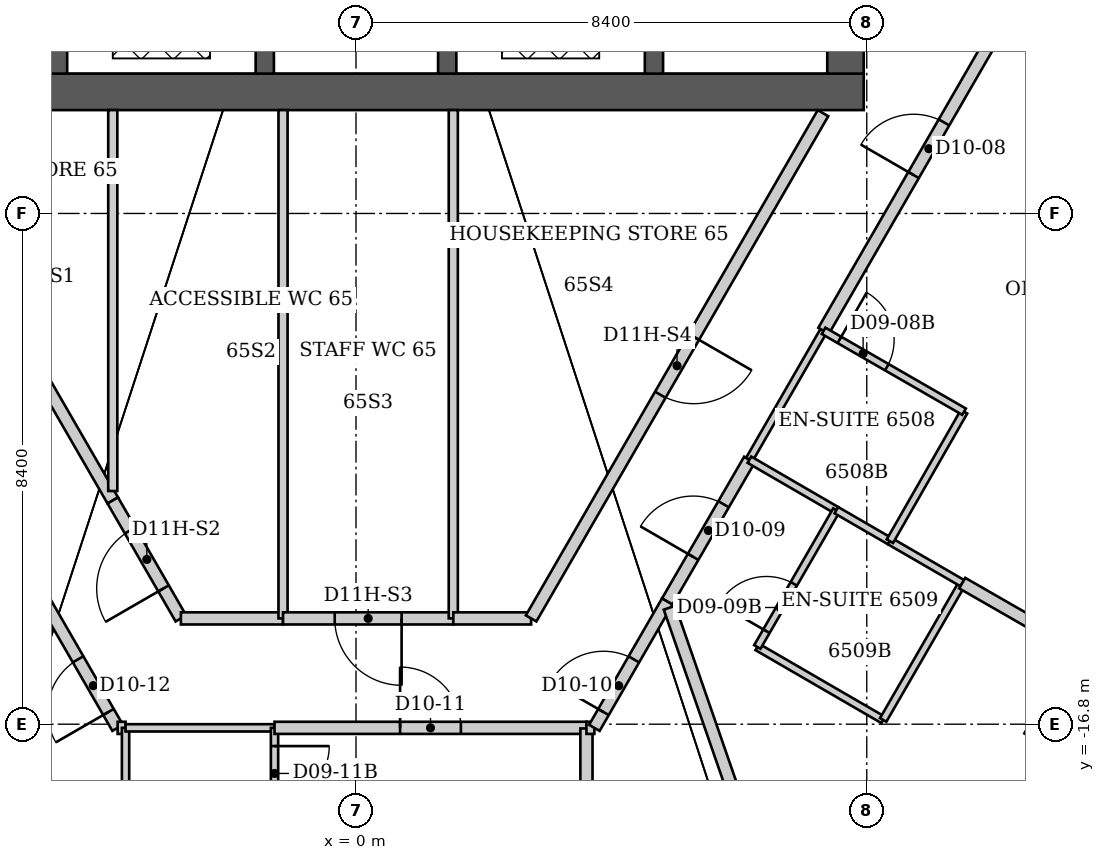
"""IFC4 building model, lengths in metres.
Left out: names, types, materials, properties, quantities, classifications, styles, units other than length and angle.
Written with IfcOpenShell. Run it as: python <this file> out.ifc"""

import sys

from ifc_helpers import new_model, si_unit, direction, frame, frame_2d, origin, place, context, subcontext, project, spatial, rectangle, extrude, element, fill, save


model = new_model("IFC4")
c1 = context("Model", 3, precision=1e-05, world=origin(), true_north=direction((0.0, 1.0)))
c2 = subcontext(c1, "Body", "Model", "MODEL_VIEW")
j1 = project(units=[si_unit("LENGTHUNIT", "METRE"), si_unit("PLANEANGLEUNIT", "RADIAN")], contexts=[c1])
p1 = place(None, origin())
s1 = spatial("IfcSite", under=j1, at=p1, CompositionType="ELEMENT")
p2 = place(p1, origin())
s2 = spatial("IfcBuilding", under=s1, at=p2, CompositionType="ELEMENT")
p3 = place(p2, frame((0.0, 0.0, 260.8)))
s3 = spatial("IfcBuildingStorey", under=s2, at=p3, CompositionType="ELEMENT", Elevation=260.8)
p4 = place(p3, frame((-8.35, -6.4, 0.0), z_axis=(0.0, 0.0, 1.0), x_axis=(1.0, 0.0, 0.0)))
e1 = element("IfcWall", 1, at=p4, inside=s3, PredefinedType="SHEAR", context=c2, shape_type="SweptSolid", body=[
    extrude(rectangle(XDim=16.7, YDim=0.6, at=frame_2d((8.35, 0.0))), origin(), (0.0, 0.0, 1.0), 3.8),
])
p5 = place(p3, frame((8.05, -6.1, 0.0), z_axis=(0.0, 0.0, 1.0), x_axis=(0.0, 1.0, 0.0)))
e2 = element("IfcWall", 2, at=p5, inside=s3, PredefinedType="SHEAR", context=c2, shape_type="SweptSolid", body=[
    extrude(rectangle(XDim=12.2, YDim=0.6, at=frame_2d((6.1, 0.0))), origin(), (0.0, 0.0, 1.0), 3.8),
])
p6 = place(p5, frame((7.6, 0.0, 0.0)))
e3 = element("IfcOpeningElement", 3, at=p6, cuts=e2, PredefinedType="OPENING", context=c2, shape_type="SweptSolid", body=[
    extrude(rectangle(XDim=1.2, YDim=2.2, at=frame_2d((0.6, 1.1))), frame((0.0, 0.3, 0.0), z_axis=(0.0, -1.0, 0.0), x_axis=(1.0, 0.0, 0.0)), (0.0, 0.0, 1.0), 0.6),
])
for number, where, z_axis, x_axis in (
    (4, (-4.9, -6.1, 0.0), (0.0, 0.0, 1.0), (0.0, 1.0, 0.0)),
    (5, (-1.5, -6.1, 0.0), (0.0, 0.0, 1.0), (0.0, 1.0, 0.0)),
    (6, (1.5, -6.1, 0.0), (0.0, 0.0, 1.0), (0.0, 1.0, 0.0)),
    (7, (4.9, -6.1, 0.0), (0.0, 0.0, 1.0), (0.0, 1.0, 0.0)),
):
    element("IfcWall", number, at=place(p3, frame(where, z_axis=z_axis, x_axis=x_axis)), inside=s3, PredefinedType="SHEAR", context=c2, shape_type="SweptSolid", body=[
        extrude(rectangle(XDim=7.2, YDim=0.3, at=frame_2d((3.6, 0.0))), origin(), (0.0, 0.0, 1.0), 3.8),
    ])
p7 = place(p3, frame((-5.12, -14.78, 0.0), z_axis=(0.0, 0.0, 1.0), x_axis=(0.499813401482, -0.866133109688, 0.0)))
e8 = element("IfcWall", 8, at=p7, inside=s3, PredefinedType="PARTITIONING", context=c2, shape_type="SweptSolid", body=[
    extrude(rectangle(XDim=2.401, YDim=0.2, at=frame_2d((1.201, 0.0))), origin(), (0.0, 0.0, 1.0), 3.64),
])
p8 = place(p7, frame((1.1, 0.0, 0.0)))
e9 = element("IfcOpeningElement", 9, at=p8, cuts=e8, PredefinedType="OPENING", context=c2, shape_type="SweptSolid", body=[
    extrude(rectangle(XDim=1.0, YDim=2.13, at=frame_2d((0.5, 1.065))), frame((0.0, 0.1, 0.0), z_axis=(0.0, -1.0, 0.0), x_axis=(1.0, 0.0, 0.0)), (0.0, 0.0, 1.0), 0.2),
])
p9 = place(p3, frame((-4.0, -13.12, 0.0), z_axis=(0.0, 0.0, 1.0), x_axis=(-0.500218436225, 0.865899252835, 0.0)))
e10 = element("IfcWall", 10, at=p9, inside=s3, PredefinedType="PARTITIONING", context=c2, shape_type="SweptSolid", body=[
    extrude(rectangle(XDim=7.357, YDim=0.2, at=frame_2d((3.678, 0.0))), origin(), (0.0, 0.0, 1.0), 3.64),
])
p10 = place(p9, frame((3.128, 0.0, 0.0)))
e11 = element("IfcOpeningElement", 11, at=p10, cuts=e10, PredefinedType="OPENING", context=c2, shape_type="SweptSolid", body=[
    extrude(rectangle(XDim=1.1, YDim=2.2, at=frame_2d((0.55, 1.1))), frame((0.0, 0.1, 0.0), z_axis=(0.0, -1.0, 0.0), x_axis=(1.0, 0.0, 0.0)), (0.0, 0.0, 1.0), 0.2),
])
p11 = place(p3, frame((-4.0, -6.7, 0.0), z_axis=(0.0, 0.0, 1.0), x_axis=(0.0, -1.0, 0.0)))
e12 = element("IfcWall", 12, at=p11, inside=s3, PredefinedType="PARTITIONING", context=c2, shape_type="SweptSolid", body=[
    extrude(rectangle(XDim=6.265, YDim=0.15, at=frame_2d((3.133, 0.0))), origin(), (0.0, 0.0, 1.0), 3.64),
])
p12 = place(p3, frame((-3.92, -16.86, 0.0), z_axis=(0.0, 0.0, 1.0), x_axis=(1.0, 0.0, 0.0)))
e13 = element("IfcWall", 13, at=p12, inside=s3, PredefinedType="PARTITIONING", context=c2, shape_type="SweptSolid", body=[
    extrude(rectangle(XDim=0.13, YDim=0.2, at=frame_2d((0.065, 0.0))), origin(), (0.0, 0.0, 1.0), 3.64),
])
p13 = place(p3, frame((-3.79, -19.53, 0.0), z_axis=(0.0, 0.0, 1.0), x_axis=(0.0, 1.0, 0.0)))
e14 = element("IfcWall", 14, at=p13, inside=s3, PredefinedType="PARTITIONING", context=c2, shape_type="SweptSolid", body=[
    extrude(rectangle(XDim=2.67, YDim=0.12, at=frame_2d((1.335, 0.0))), origin(), (0.0, 0.0, 1.0), 3.64),
])
p14 = place(p3, frame((-3.79, -16.86, 0.0), z_axis=(0.0, 0.0, 1.0), x_axis=(1.0, 0.0, 0.0)))
e15 = element("IfcWall", 15, at=p14, inside=s3, PredefinedType="PARTITIONING", context=c2, shape_type="SweptSolid", body=[
    extrude(rectangle(XDim=2.45, YDim=0.12, at=frame_2d((1.225, 0.0))), origin(), (0.0, 0.0, 1.0), 3.64),
])
p15 = place(p3, frame((-2.88, -15.06, 0.0), z_axis=(0.0, 0.0, 1.0), x_axis=(-0.499983441833, 0.866034963436, 0.0)))
e16 = element("IfcWall", 16, at=p15, inside=s3, PredefinedType="PARTITIONING", context=c2, shape_type="SweptSolid", body=[
    extrude(rectangle(XDim=2.24, YDim=0.2, at=frame_2d((1.12, 0.0))), origin(), (0.0, 0.0, 1.0), 3.64),
])
p16 = place(p15, frame((0.57, 0.0, 0.0)))
e17 = element("IfcOpeningElement", 17, at=p16, cuts=e16, PredefinedType="OPENING", context=c2, shape_type="SweptSolid", body=[
    extrude(rectangle(XDim=1.1, YDim=2.2, at=frame_2d((0.55, 1.1))), frame((0.0, 0.1, 0.0), z_axis=(0.0, -1.0, 0.0), x_axis=(1.0, 0.0, 0.0)), (0.0, 0.0, 1.0), 0.2),
])
p17 = place(p3, frame((-1.34, -19.53, 0.0), z_axis=(0.0, 0.0, 1.0), x_axis=(0.0, 1.0, 0.0)))
e18 = element("IfcWall", 18, at=p17, inside=s3, PredefinedType="PARTITIONING", context=c2, shape_type="SweptSolid", body=[
    extrude(rectangle(XDim=2.67, YDim=0.12, at=frame_2d((1.335, 0.0))), origin(), (0.0, 0.0, 1.0), 3.64),
])
p18 = place(p17, frame((1.47, 0.0, 0.0)))
e19 = element("IfcOpeningElement", 19, at=p18, cuts=e18, PredefinedType="OPENING", context=c2, shape_type="SweptSolid", body=[
    extrude(rectangle(XDim=0.9, YDim=2.03, at=frame_2d((0.45, 1.015))), frame((0.0, 0.06, 0.0), z_axis=(0.0, -1.0, 0.0), x_axis=(1.0, 0.0, 0.0)), (0.0, 0.0, 1.0), 0.12),
])
p19 = place(p3, frame((-1.34, -16.86, 0.0), z_axis=(0.0, 0.0, 1.0), x_axis=(1.0, 0.0, 0.0)))
e20 = element("IfcWall", 20, at=p19, inside=s3, PredefinedType="PARTITIONING", context=c2, shape_type="SweptSolid", body=[
    extrude(rectangle(XDim=5.13, YDim=0.2, at=frame_2d((2.565, 0.0))), origin(), (0.0, 0.0, 1.0), 3.64),
])
p20 = place(p19, frame((2.065, 0.0, 0.0)))
e21 = element("IfcOpeningElement", 21, at=p20, cuts=e20, PredefinedType="OPENING", context=c2, shape_type="SweptSolid", body=[
    extrude(rectangle(XDim=1.0, YDim=2.13, at=frame_2d((0.5, 1.065))), frame((0.0, 0.1, 0.0), z_axis=(0.0, -1.0, 0.0), x_axis=(1.0, 0.0, 0.0)), (0.0, 0.0, 1.0), 0.2),
])
p21 = place(p3, frame((-1.2, -15.06, 0.0), z_axis=(0.0, 0.0, 1.0), x_axis=(-1.0, 0.0, 0.0)))
e22 = element("IfcWall", 22, at=p21, inside=s3, PredefinedType="PARTITIONING", context=c2, shape_type="SweptSolid", body=[
    extrude(rectangle(XDim=1.68, YDim=0.2, at=frame_2d((0.84, 0.0))), origin(), (0.0, 0.0, 1.0), 3.64),
])
p22 = place(p3, frame((-1.2, -6.7, 0.0), z_axis=(0.0, 0.0, 1.0), x_axis=(0.0, -1.0, 0.0)))
e23 = element("IfcWall", 23, at=p22, inside=s3, PredefinedType="PARTITIONING", context=c2, shape_type="SweptSolid", body=[
    extrude(rectangle(XDim=8.36, YDim=0.15, at=frame_2d((4.18, 0.0))), origin(), (0.0, 0.0, 1.0), 3.64),
])
p23 = place(p3, frame((1.6, -15.06, 0.0), z_axis=(0.0, 0.0, 1.0), x_axis=(-1.0, 0.0, 0.0)))
e24 = element("IfcWall", 24, at=p23, inside=s3, PredefinedType="PARTITIONING", context=c2, shape_type="SweptSolid", body=[
    extrude(rectangle(XDim=2.8, YDim=0.2, at=frame_2d((1.4, 0.0))), origin(), (0.0, 0.0, 1.0), 3.64),
])
p24 = place(p23, frame((0.85, 0.0, 0.0)))
e25 = element("IfcOpeningElement", 25, at=p24, cuts=e24, PredefinedType="OPENING", context=c2, shape_type="SweptSolid", body=[
    extrude(rectangle(XDim=1.1, YDim=2.2, at=frame_2d((0.55, 1.1))), frame((0.0, 0.1, 0.0), z_axis=(0.0, -1.0, 0.0), x_axis=(1.0, 0.0, 0.0)), (0.0, 0.0, 1.0), 0.2),
])
p25 = place(p3, frame((1.6, -6.7, 0.0), z_axis=(0.0, 0.0, 1.0), x_axis=(0.0, -1.0, 0.0)))
e26 = element("IfcWall", 26, at=p25, inside=s3, PredefinedType="PARTITIONING", context=c2, shape_type="SweptSolid", body=[
    extrude(rectangle(XDim=8.36, YDim=0.15, at=frame_2d((4.18, 0.0))), origin(), (0.0, 0.0, 1.0), 2.86),
])
p26 = place(p3, frame((2.88, -15.06, 0.0), z_axis=(0.0, 0.0, 1.0), x_axis=(-1.0, 0.0, 0.0)))
e27 = element("IfcWall", 27, at=p26, inside=s3, PredefinedType="PARTITIONING", context=c2, shape_type="SweptSolid", body=[
    extrude(rectangle(XDim=1.28, YDim=0.2, at=frame_2d((0.64, 0.0))), origin(), (0.0, 0.0, 1.0), 3.64),
])
p27 = place(p3, frame((3.79, -20.51, 0.0), z_axis=(0.0, 0.0, 1.0), x_axis=(0.0, 1.0, 0.0)))
e28 = element("IfcWall", 28, at=p27, inside=s3, PredefinedType="PARTITIONING", context=c2, shape_type="SweptSolid", body=[
    extrude(rectangle(XDim=3.64, YDim=0.2, at=frame_2d((1.82, 0.0))), origin(), (0.0, 0.0, 1.0), 3.64),
])
p28 = place(p3, frame((3.79, -16.86, 0.0), z_axis=(0.0, 0.0, 1.0), x_axis=(1.0, 0.0, 0.0)))
e29 = element("IfcWall", 29, at=p28, inside=s3, PredefinedType="PARTITIONING", context=c2, shape_type="SweptSolid", body=[
    extrude(rectangle(XDim=0.13, YDim=0.2, at=frame_2d((0.065, 0.0))), origin(), (0.0, 0.0, 1.0), 3.64),
])
p29 = place(p3, frame((3.92, -16.86, 0.0), z_axis=(0.0, 0.0, 1.0), x_axis=(0.499693115345, 0.866202511239, 0.0)))
e30 = element("IfcWall", 30, at=p29, inside=s3, PredefinedType="PARTITIONING", context=c2, shape_type="SweptSolid", body=[
    extrude(rectangle(XDim=2.401, YDim=0.2, at=frame_2d((1.201, 0.0))), origin(), (0.0, 0.0, 1.0), 3.64),
])
p30 = place(p29, frame((0.3, 0.0, 0.0)))
e31 = element("IfcOpeningElement", 31, at=p30, cuts=e30, PredefinedType="OPENING", context=c2, shape_type="SweptSolid", body=[
    extrude(rectangle(XDim=1.0, YDim=2.13, at=frame_2d((0.5, 1.065))), frame((0.0, 0.1, 0.0), z_axis=(0.0, -1.0, 0.0), x_axis=(1.0, 0.0, 0.0)), (0.0, 0.0, 1.0), 0.2),
])
p31 = place(p3, frame((5.12, -14.78, 0.0), z_axis=(0.0, 0.0, 1.0), x_axis=(0.501343576294, 0.865248298761, 0.0)))
e32 = element("IfcWall", 32, at=p31, inside=s3, PredefinedType="PARTITIONING", context=c2, shape_type="SweptSolid", body=[
    extrude(rectangle(XDim=2.693, YDim=0.2, at=frame_2d((1.346, 0.0))), origin(), (0.0, 0.0, 1.0), 3.64),
])
p32 = place(p31, frame((0.846, 0.0, 0.0)))
e33 = element("IfcOpeningElement", 33, at=p32, cuts=e32, PredefinedType="OPENING", context=c2, shape_type="SweptSolid", body=[
    extrude(rectangle(XDim=1.0, YDim=2.13, at=frame_2d((0.5, 1.065))), frame((0.0, 0.1, 0.0), z_axis=(0.0, -1.0, 0.0), x_axis=(1.0, 0.0, 0.0)), (0.0, 0.0, 1.0), 0.2),
])
p33 = place(p3, frame((6.467, -12.448, 0.0), z_axis=(0.0, 0.0, 1.0), x_axis=(0.499875104448, 0.866097500258, 0.0)))
e34 = element("IfcWall", 34, at=p33, inside=s3, PredefinedType="PARTITIONING", context=c2, shape_type="SweptSolid", body=[
    extrude(rectangle(XDim=2.446, YDim=0.12, at=frame_2d((1.223, 0.0))), origin(), (0.0, 0.0, 1.0), 3.64),
])
p34 = place(p3, frame((6.47, -12.45, 0.0), z_axis=(0.0, 0.0, 1.0), x_axis=(0.864842719649, -0.502042896843, 0.0)))
e35 = element("IfcWall", 35, at=p34, inside=s3, PredefinedType="PARTITIONING", context=c2, shape_type="SweptSolid", body=[
    extrude(rectangle(XDim=1.653, YDim=0.12, at=frame_2d((0.827, 0.0))), origin(), (0.0, 0.0, 1.0), 3.64),
])
p35 = place(p3, frame((6.6, -15.53, 0.0), z_axis=(0.0, 0.0, 1.0), x_axis=(0.865130376012, -0.501547039172, 0.0)))
e36 = element("IfcWall", 36, at=p35, inside=s3, PredefinedType="PARTITIONING", context=c2, shape_type="SweptSolid", body=[
    extrude(rectangle(XDim=2.393, YDim=0.12, at=frame_2d((1.196, 0.0))), origin(), (0.0, 0.0, 1.0), 3.64),
])
p36 = place(p3, frame((7.68, -6.75, 0.0), z_axis=(0.0, 0.0, 1.0), x_axis=(-0.500174600737, -0.865924574532, 0.0)))
e37 = element("IfcWall", 37, at=p36, inside=s3, PredefinedType="PARTITIONING", context=c2, shape_type="SweptSolid", body=[
    extrude(rectangle(XDim=9.597, YDim=0.2, at=frame_2d((4.798, 0.0))), origin(), (0.0, 0.0, 1.0), 3.64),
])
p37 = place(p36, frame((4.248, 0.0, 0.0)))
e38 = element("IfcOpeningElement", 38, at=p37, cuts=e37, PredefinedType="OPENING", context=c2, shape_type="SweptSolid", body=[
    extrude(rectangle(XDim=1.1, YDim=2.2, at=frame_2d((0.55, 1.1))), frame((0.0, 0.1, 0.0), z_axis=(0.0, -1.0, 0.0), x_axis=(1.0, 0.0, 0.0)), (0.0, 0.0, 1.0), 0.2),
])
p38 = place(p3, frame((7.69, -10.33, 0.0), z_axis=(0.0, 0.0, 1.0), x_axis=(0.500177633683, 0.865922822637, 0.0)))
e39 = element("IfcWall", 39, at=p38, inside=s3, PredefinedType="PARTITIONING", context=c2, shape_type="SweptSolid", body=[
    extrude(rectangle(XDim=6.917, YDim=0.2, at=frame_2d((3.459, 0.0))), origin(), (0.0, 0.0, 1.0), 3.64),
])
p39 = place(p38, frame((2.959, 0.0, 0.0)))
e40 = element("IfcOpeningElement", 40, at=p39, cuts=e39, PredefinedType="OPENING", context=c2, shape_type="SweptSolid", body=[
    extrude(rectangle(XDim=1.0, YDim=2.13, at=frame_2d((0.5, 1.065))), frame((0.0, 0.1, 0.0), z_axis=(0.0, -1.0, 0.0), x_axis=(1.0, 0.0, 0.0)), (0.0, 0.0, 1.0), 0.2),
])
p40 = place(p3, frame((7.9, -13.28, 0.0), z_axis=(0.0, 0.0, 1.0), x_axis=(-0.500221244143, -0.865897630733, 0.0)))
e41 = element("IfcWall", 41, at=p40, inside=s3, PredefinedType="PARTITIONING", context=c2, shape_type="SweptSolid", body=[
    extrude(rectangle(XDim=2.598, YDim=0.12, at=frame_2d((1.299, 0.0))), origin(), (0.0, 0.0, 1.0), 3.64),
])
p41 = place(p40, frame((1.399, 0.0, 0.0)))
e42 = element("IfcOpeningElement", 42, at=p41, cuts=e41, PredefinedType="OPENING", context=c2, shape_type="SweptSolid", body=[
    extrude(rectangle(XDim=0.9, YDim=2.03, at=frame_2d((0.45, 1.015))), frame((0.0, 0.06, 0.0), z_axis=(0.0, -1.0, 0.0), x_axis=(1.0, 0.0, 0.0)), (0.0, 0.0, 1.0), 0.12),
])
p42 = place(p3, frame((7.9, -13.28, 0.0), z_axis=(0.0, 0.0, 1.0), x_axis=(0.86522903342, -0.501376824082, 0.0)))
e43 = element("IfcWall", 43, at=p42, inside=s3, PredefinedType="PARTITIONING", context=c2, shape_type="SweptSolid", body=[
    extrude(rectangle(XDim=1.017, YDim=0.12, at=frame_2d((0.509, 0.0))), origin(), (0.0, 0.0, 1.0), 3.64),
])
p43 = place(p3, frame((8.45, -24.382, 0.0), z_axis=(0.0, 0.0, 1.0), x_axis=(-0.327686879249, 0.944786382823, 0.0)))
e44 = element("IfcWall", 44, at=p43, inside=s3, PredefinedType="PARTITIONING", context=c2, shape_type="SweptSolid", body=[
    extrude(rectangle(XDim=10.053, YDim=0.2, at=frame_2d((5.026, 0.0))), origin(), (0.0, 0.0, 1.0), 3.64),
])
p44 = place(p3, frame((8.67, -16.73, 0.0), z_axis=(0.0, 0.0, 1.0), x_axis=(0.500291685314, 0.865856933682, 0.0)))
e45 = element("IfcWall", 45, at=p44, inside=s3, PredefinedType="PARTITIONING", context=c2, shape_type="SweptSolid", body=[
    extrude(rectangle(XDim=2.599, YDim=0.12, at=frame_2d((1.299, 0.0))), origin(), (0.0, 0.0, 1.0), 3.64),
])
p45 = place(p3, frame((8.78, -13.79, 0.0), z_axis=(0.0, 0.0, 1.0), x_axis=(0.865102050426, -0.501595895466, 0.0)))
e46 = element("IfcWall", 46, at=p45, inside=s3, PredefinedType="PARTITIONING", context=c2, shape_type="SweptSolid", body=[
    extrude(rectangle(XDim=1.375, YDim=0.12, at=frame_2d((0.688, 0.0))), origin(), (0.0, 0.0, 1.0), 3.64),
])
p46 = place(p3, frame((8.78, -13.79, 0.0), z_axis=(0.0, 0.0, 1.0), x_axis=(0.497027744361, 0.86773464915, 0.0)))
e47 = element("IfcWall", 47, at=p46, inside=s3, PredefinedType="PARTITIONING", context=c2, shape_type="SweptSolid", body=[
    extrude(rectangle(XDim=2.455, YDim=0.12, at=frame_2d((1.227, 0.0))), origin(), (0.0, 0.0, 1.0), 3.64),
])
p47 = place(p3, frame((9.97, -14.48, 0.0), z_axis=(0.0, 0.0, 1.0), x_axis=(0.867154119852, -0.498039890395, 0.0)))
e48 = element("IfcWall", 48, at=p47, inside=s3, PredefinedType="PARTITIONING", context=c2, shape_type="SweptSolid", body=[
    extrude(rectangle(XDim=3.926, YDim=0.2, at=frame_2d((1.963, 0.0))), origin(), (0.0, 0.0, 1.0), 3.64),
])
p48 = place(p3, frame((10.0, -11.66, 0.0), z_axis=(0.0, 0.0, 1.0), x_axis=(-0.866654860089, 0.498908161372, 0.0)))
e49 = element("IfcWall", 49, at=p48, inside=s3, PredefinedType="PARTITIONING", context=c2, shape_type="SweptSolid", body=[
    extrude(rectangle(XDim=2.666, YDim=0.12, at=frame_2d((1.333, 0.0))), origin(), (0.0, 0.0, 1.0), 3.023),
])
p49 = place(p48, frame((1.466, 0.0, 0.0)))
e50 = element("IfcOpeningElement", 50, at=p49, cuts=e49, PredefinedType="OPENING", context=c2, shape_type="SweptSolid", body=[
    extrude(rectangle(XDim=0.9, YDim=2.03, at=frame_2d((0.45, 1.015))), frame((0.0, 0.06, 0.0), z_axis=(0.0, -1.0, 0.0), x_axis=(1.0, 0.0, 0.0)), (0.0, 0.0, 1.0), 0.12),
])
p50 = place(p39, origin())
e51 = element("IfcDoor", 51, at=p50, inside=s3, OperationType="SINGLE_SWING_LEFT", PredefinedType="DOOR", context=c2, shape_type="SweptSolid", body=[
    extrude(rectangle(XDim=1.0, YDim=2.13, at=frame_2d((0.5, 1.065))), frame((0.0, 0.025, 0.0), z_axis=(0.0, -1.0, 0.0), x_axis=(1.0, 0.0, 0.0)), (0.0, 0.0, 1.0), 0.05),
])
fill(e40, e51)
p51 = place(p49, origin())
e52 = element("IfcDoor", 52, at=p51, inside=s3, OperationType="SINGLE_SWING_RIGHT", PredefinedType="DOOR", context=c2, shape_type="SweptSolid", body=[
    extrude(rectangle(XDim=0.9, YDim=2.03, at=frame_2d((0.45, 1.015))), frame((0.0, 0.025, 0.0), z_axis=(0.0, -1.0, 0.0), x_axis=(1.0, 0.0, 0.0)), (0.0, 0.0, 1.0), 0.05),
])
fill(e50, e52)
p52 = place(p32, origin())
e53 = element("IfcDoor", 53, at=p52, inside=s3, OperationType="SINGLE_SWING_LEFT", PredefinedType="DOOR", context=c2, shape_type="SweptSolid", body=[
    extrude(rectangle(XDim=1.0, YDim=2.13, at=frame_2d((0.5, 1.065))), frame((0.0, 0.025, 0.0), z_axis=(0.0, -1.0, 0.0), x_axis=(1.0, 0.0, 0.0)), (0.0, 0.0, 1.0), 0.05),
])
fill(e33, e53)
p53 = place(p41, origin())
e54 = element("IfcDoor", 54, at=p53, inside=s3, OperationType="SINGLE_SWING_RIGHT", PredefinedType="DOOR", context=c2, shape_type="SweptSolid", body=[
    extrude(rectangle(XDim=0.9, YDim=2.03, at=frame_2d((0.45, 1.015))), frame((0.0, 0.025, 0.0), z_axis=(0.0, -1.0, 0.0), x_axis=(1.0, 0.0, 0.0)), (0.0, 0.0, 1.0), 0.05),
])
fill(e42, e54)
p54 = place(p30, origin())
e55 = element("IfcDoor", 55, at=p54, inside=s3, OperationType="SINGLE_SWING_LEFT", PredefinedType="DOOR", context=c2, shape_type="SweptSolid", body=[
    extrude(rectangle(XDim=1.0, YDim=2.13, at=frame_2d((0.5, 1.065))), frame((0.0, 0.025, 0.0), z_axis=(0.0, -1.0, 0.0), x_axis=(1.0, 0.0, 0.0)), (0.0, 0.0, 1.0), 0.05),
])
fill(e31, e55)
p55 = place(p20, origin())
e56 = element("IfcDoor", 56, at=p55, inside=s3, OperationType="SINGLE_SWING_LEFT", PredefinedType="DOOR", context=c2, shape_type="SweptSolid", body=[
    extrude(rectangle(XDim=1.0, YDim=2.13, at=frame_2d((0.5, 1.065))), frame((0.0, 0.025, 0.0), z_axis=(0.0, -1.0, 0.0), x_axis=(1.0, 0.0, 0.0)), (0.0, 0.0, 1.0), 0.05),
])
fill(e21, e56)
p56 = place(p18, origin())
e57 = element("IfcDoor", 57, at=p56, inside=s3, OperationType="SINGLE_SWING_RIGHT", PredefinedType="DOOR", context=c2, shape_type="SweptSolid", body=[
    extrude(rectangle(XDim=0.9, YDim=2.03, at=frame_2d((0.45, 1.015))), frame((0.0, 0.025, 0.0), z_axis=(0.0, -1.0, 0.0), x_axis=(1.0, 0.0, 0.0)), (0.0, 0.0, 1.0), 0.05),
])
fill(e19, e57)
p57 = place(p8, origin())
e58 = element("IfcDoor", 58, at=p57, inside=s3, OperationType="SINGLE_SWING_RIGHT", PredefinedType="DOOR", context=c2, shape_type="SweptSolid", body=[
    extrude(rectangle(XDim=1.0, YDim=2.13, at=frame_2d((0.5, 1.065))), frame((0.0, 0.025, 0.0), z_axis=(0.0, -1.0, 0.0), x_axis=(1.0, 0.0, 0.0)), (0.0, 0.0, 1.0), 0.05),
])
fill(e9, e58)
p58 = place(p16, origin())
e59 = element("IfcDoor", 59, at=p58, inside=s3, OperationType="SINGLE_SWING_LEFT", PredefinedType="DOOR", context=c2, shape_type="SweptSolid", body=[
    extrude(rectangle(XDim=1.1, YDim=2.2, at=frame_2d((0.55, 1.1))), frame((0.0, 0.025, 0.0), z_axis=(0.0, -1.0, 0.0), x_axis=(1.0, 0.0, 0.0)), (0.0, 0.0, 1.0), 0.05),
])
fill(e17, e59)
p59 = place(p24, origin())
e60 = element("IfcDoor", 60, at=p59, inside=s3, OperationType="SINGLE_SWING_LEFT", PredefinedType="DOOR", context=c2, shape_type="SweptSolid", body=[
    extrude(rectangle(XDim=1.1, YDim=2.2, at=frame_2d((0.55, 1.1))), frame((0.0, 0.025, 0.0), z_axis=(0.0, -1.0, 0.0), x_axis=(1.0, 0.0, 0.0)), (0.0, 0.0, 1.0), 0.05),
])
fill(e25, e60)
p60 = place(p37, origin())
e61 = element("IfcDoor", 61, at=p60, inside=s3, OperationType="SINGLE_SWING_LEFT", PredefinedType="DOOR", context=c2, shape_type="SweptSolid", body=[
    extrude(rectangle(XDim=1.1, YDim=2.2, at=frame_2d((0.55, 1.1))), frame((0.0, 0.025, 0.0), z_axis=(0.0, -1.0, 0.0), x_axis=(1.0, 0.0, 0.0)), (0.0, 0.0, 1.0), 0.05),
])
fill(e38, e61)
save(model, sys.argv[1])
